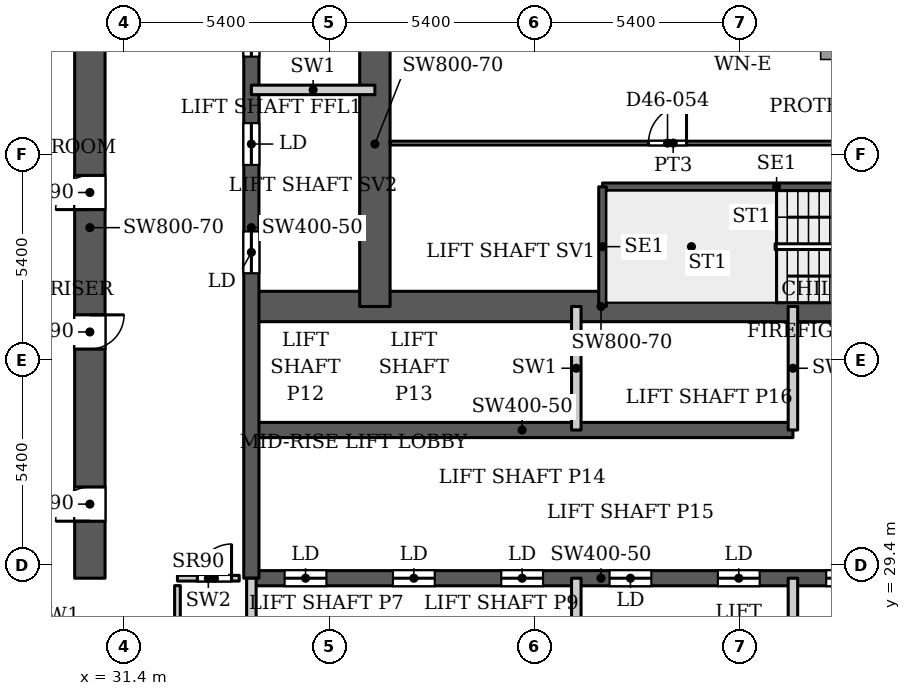
"""IFC4 building model, lengths in metres.
Left out: names, types, materials, properties, quantities, classifications, styles, units other than length and angle.
Written with IfcOpenShell. Run it as: python <this file> out.ifc"""

import sys

from ifc_helpers import new_model, si_unit, direction, frame, frame_2d, origin, place, context, subcontext, project, spatial, rectangle, extrude, source, transform, mapped, element, fill, save


model = new_model("IFC4")
c1 = context("Model", 3, precision=1e-05, world=origin(), true_north=direction((0.0, 1.0)))
c2 = subcontext(c1, "Body", "Model", "MODEL_VIEW")
j1 = project(units=[si_unit("LENGTHUNIT", "METRE"), si_unit("PLANEANGLEUNIT", "RADIAN")], contexts=[c1])
p1 = place(None, origin())
s1 = spatial("IfcSite", under=j1, at=p1, CompositionType="ELEMENT")
p2 = place(p1, origin())
s2 = spatial("IfcBuilding", under=s1, at=p2, CompositionType="ELEMENT")
p3 = place(p2, frame((0.0, 0.0, 199.4)))
s3 = spatial("IfcBuildingStorey", under=s2, at=p3, CompositionType="ELEMENT", Elevation=199.4)
p4 = place(p3, frame((34.75, 29.05, 0.0), z_axis=(0.0, 0.0, 1.0), x_axis=(1.0, 0.0, 0.0)))
e1 = element("IfcWall", 1, at=p4, inside=s3, PredefinedType="SHEAR", context=c2, shape_type="SweptSolid", body=[
    extrude(rectangle(XDim=18.4, YDim=0.4, at=frame_2d((9.2, 0.0))), origin(), (0.0, 0.0, 1.0), 3.9),
])
p5 = place(p4, frame((0.875, 0.0, 0.0)))
e2 = element("IfcOpeningElement", 2, at=p5, cuts=e1, PredefinedType="OPENING", context=c2, shape_type="SweptSolid", body=[
    extrude(rectangle(XDim=1.1, YDim=2.2, at=frame_2d((0.55, 1.1))), frame((0.0, 0.21, 0.0), z_axis=(0.0, -1.0, 0.0), x_axis=(1.0, 0.0, 0.0)), (0.0, 0.0, 1.0), 0.42),
])
p6 = place(p4, frame((3.725, 0.0, 0.0)))
e3 = element("IfcOpeningElement", 3, at=p6, cuts=e1, PredefinedType="OPENING", context=c2, shape_type="SweptSolid", body=[
    extrude(rectangle(XDim=1.1, YDim=2.2, at=frame_2d((0.55, 1.1))), frame((0.0, 0.21, 0.0), z_axis=(0.0, -1.0, 0.0), x_axis=(1.0, 0.0, 0.0)), (0.0, 0.0, 1.0), 0.42),
])
p7 = place(p4, frame((6.575, 0.0, 0.0)))
e4 = element("IfcOpeningElement", 4, at=p7, cuts=e1, PredefinedType="OPENING", context=c2, shape_type="SweptSolid", body=[
    extrude(rectangle(XDim=1.1, YDim=2.2, at=frame_2d((0.55, 1.1))), frame((0.0, 0.21, 0.0), z_axis=(0.0, -1.0, 0.0), x_axis=(1.0, 0.0, 0.0)), (0.0, 0.0, 1.0), 0.42),
])
p8 = place(p4, frame((9.425, 0.0, 0.0)))
e5 = element("IfcOpeningElement", 5, at=p8, cuts=e1, PredefinedType="OPENING", context=c2, shape_type="SweptSolid", body=[
    extrude(rectangle(XDim=1.1, YDim=2.2, at=frame_2d((0.55, 1.1))), frame((0.0, 0.21, 0.0), z_axis=(0.0, -1.0, 0.0), x_axis=(1.0, 0.0, 0.0)), (0.0, 0.0, 1.0), 0.42),
])
p9 = place(p4, frame((12.275, 0.0, 0.0)))
e6 = element("IfcOpeningElement", 6, at=p9, cuts=e1, PredefinedType="OPENING", context=c2, shape_type="SweptSolid", body=[
    extrude(rectangle(XDim=1.1, YDim=2.2, at=frame_2d((0.55, 1.1))), frame((0.0, 0.21, 0.0), z_axis=(0.0, -1.0, 0.0), x_axis=(1.0, 0.0, 0.0)), (0.0, 0.0, 1.0), 0.42),
])
p10 = place(p4, frame((15.125, 0.0, 0.0)))
e7 = element("IfcOpeningElement", 7, at=p10, cuts=e1, PredefinedType="OPENING", context=c2, shape_type="SweptSolid", body=[
    extrude(rectangle(XDim=1.1, YDim=2.2, at=frame_2d((0.55, 1.1))), frame((0.0, 0.21, 0.0), z_axis=(0.0, -1.0, 0.0), x_axis=(1.0, 0.0, 0.0)), (0.0, 0.0, 1.0), 0.42),
])
p11 = place(p3, frame((34.75, 32.95, 0.0), z_axis=(0.0, 0.0, 1.0), x_axis=(1.0, 0.0, 0.0)))
e8 = element("IfcWall", 8, at=p11, inside=s3, PredefinedType="SHEAR", context=c2, shape_type="SweptSolid", body=[
    extrude(rectangle(XDim=14.25, YDim=0.4, at=frame_2d((7.125, 0.0))), origin(), (0.0, 0.0, 1.0), 3.9),
])
p12 = place(p3, frame((34.75, 36.2, 0.0), z_axis=(0.0, 0.0, 1.0), x_axis=(1.0, 0.0, 0.0)))
e9 = element("IfcWall", 9, at=p12, inside=s3, PredefinedType="SHEAR", context=c2, shape_type="SweptSolid", body=[
    extrude(rectangle(XDim=18.4, YDim=0.8, at=frame_2d((9.2, 0.0))), origin(), (0.0, 0.0, 1.0), 3.9),
])
p13 = place(p12, frame((16.9, 0.0, 0.0)))
e10 = element("IfcOpeningElement", 10, at=p13, cuts=e9, PredefinedType="OPENING", context=c2, shape_type="SweptSolid", body=[
    extrude(rectangle(XDim=1.0, YDim=2.2, at=frame_2d((0.5, 1.1))), frame((0.0, 0.41, 0.0), z_axis=(0.0, -1.0, 0.0), x_axis=(1.0, 0.0, 0.0)), (0.0, 0.0, 1.0), 0.82),
])
p14 = place(p3, frame((34.75, 29.05, 0.0), z_axis=(0.0, 0.0, 1.0), x_axis=(0.0, 1.0, 0.0)))
e11 = element("IfcWall", 11, at=p14, inside=s3, PredefinedType="SHEAR", context=c2, shape_type="SweptSolid", body=[
    extrude(rectangle(XDim=18.45, YDim=0.4, at=frame_2d((9.225, 0.0))), origin(), (0.0, 0.0, 1.0), 3.9),
])
p15 = place(p14, frame((8.025, 0.0, 0.0)))
e12 = element("IfcOpeningElement", 12, at=p15, cuts=e11, PredefinedType="OPENING", context=c2, shape_type="SweptSolid", body=[
    extrude(rectangle(XDim=1.1, YDim=2.2, at=frame_2d((0.55, 1.1))), frame((0.0, 0.21, 0.0), z_axis=(0.0, -1.0, 0.0), x_axis=(1.0, 0.0, 0.0)), (0.0, 0.0, 1.0), 0.42),
])
p16 = place(p14, frame((10.875, 0.0, 0.0)))
e13 = element("IfcOpeningElement", 13, at=p16, cuts=e11, PredefinedType="OPENING", context=c2, shape_type="SweptSolid", body=[
    extrude(rectangle(XDim=1.1, YDim=2.2, at=frame_2d((0.55, 1.1))), frame((0.0, 0.21, 0.0), z_axis=(0.0, -1.0, 0.0), x_axis=(1.0, 0.0, 0.0)), (0.0, 0.0, 1.0), 0.42),
])
p17 = place(p14, frame((13.725, 0.0, 0.0)))
e14 = element("IfcOpeningElement", 14, at=p17, cuts=e11, PredefinedType="OPENING", context=c2, shape_type="SweptSolid", body=[
    extrude(rectangle(XDim=1.1, YDim=2.2, at=frame_2d((0.55, 1.1))), frame((0.0, 0.21, 0.0), z_axis=(0.0, -1.0, 0.0), x_axis=(1.0, 0.0, 0.0)), (0.0, 0.0, 1.0), 0.42),
])
p18 = place(p14, frame((15.95, 0.0, 0.0)))
e15 = element("IfcOpeningElement", 15, at=p18, cuts=e11, PredefinedType="OPENING", context=c2, shape_type="SweptSolid", body=[
    extrude(rectangle(XDim=1.1, YDim=2.2, at=frame_2d((0.55, 1.1))), frame((0.0, 0.21, 0.0), z_axis=(0.0, -1.0, 0.0), x_axis=(1.0, 0.0, 0.0)), (0.0, 0.0, 1.0), 0.42),
])
p19 = place(p3, frame((38.0, 36.2, 0.0), z_axis=(0.0, 0.0, 1.0), x_axis=(0.0, 1.0, 0.0)))
e16 = element("IfcWall", 16, at=p19, inside=s3, PredefinedType="SHEAR", context=c2, shape_type="SweptSolid", body=[
    extrude(rectangle(XDim=8.55, YDim=0.8, at=frame_2d((4.275, 0.0))), origin(), (0.0, 0.0, 1.0), 3.9),
])
p20 = place(p3, frame((30.5, 29.05, 0.0), z_axis=(0.0, 0.0, 1.0), x_axis=(0.0, 1.0, 0.0)))
e17 = element("IfcWall", 17, at=p20, inside=s3, PredefinedType="SHEAR", context=c2, shape_type="SweptSolid", body=[
    extrude(rectangle(XDim=18.45, YDim=0.8, at=frame_2d((9.225, 0.0))), origin(), (0.0, 0.0, 1.0), 3.9),
])
p21 = place(p20, frame((1.5, 0.0, 0.0)))
e18 = element("IfcOpeningElement", 18, at=p21, cuts=e17, PredefinedType="OPENING", context=c2, shape_type="SweptSolid", body=[
    extrude(rectangle(XDim=0.9, YDim=2.2, at=frame_2d((0.45, 1.1))), frame((0.0, 0.41, 0.0), z_axis=(0.0, -1.0, 0.0), x_axis=(1.0, 0.0, 0.0)), (0.0, 0.0, 1.0), 0.82),
])
p22 = place(p20, frame((6.03, 0.0, 0.0)))
e19 = element("IfcOpeningElement", 19, at=p22, cuts=e17, PredefinedType="OPENING", context=c2, shape_type="SweptSolid", body=[
    extrude(rectangle(XDim=0.9, YDim=2.2, at=frame_2d((0.45, 1.1))), frame((0.0, 0.41, 0.0), z_axis=(0.0, -1.0, 0.0), x_axis=(1.0, 0.0, 0.0)), (0.0, 0.0, 1.0), 0.82),
])
p23 = place(p20, frame((9.7, 0.0, 0.0)))
e20 = element("IfcOpeningElement", 20, at=p23, cuts=e17, PredefinedType="OPENING", context=c2, shape_type="SweptSolid", body=[
    extrude(rectangle(XDim=0.9, YDim=2.2, at=frame_2d((0.45, 1.1))), frame((0.0, 0.41, 0.0), z_axis=(0.0, -1.0, 0.0), x_axis=(1.0, 0.0, 0.0)), (0.0, 0.0, 1.0), 0.82),
])
p24 = place(p3, frame((29.712, 26.072, 0.0), z_axis=(0.0, 0.0, 1.0), x_axis=(-0.511028049012, 0.859564036662, 0.0)))
e21 = element("IfcWall", 21, at=p24, inside=s3, PredefinedType="SOLIDWALL", context=c2, shape_type="SweptSolid", body=[
    extrude(rectangle(XDim=4.634, YDim=0.25, at=frame_2d((2.317, 0.0))), origin(), (0.0, 0.0, 1.0), 3.217),
])
p25 = place(p3, frame((27.195, 31.969, 0.0), z_axis=(0.0, 0.0, 1.0), x_axis=(0.052554995867, 0.998618031286, 0.0)))
e22 = element("IfcWall", 22, at=p25, inside=s3, PredefinedType="SOLIDWALL", context=c2, shape_type="SweptSolid", body=[
    extrude(rectangle(XDim=66.787, YDim=0.25, at=frame_2d((33.394, 0.0))), origin(), (0.0, 0.0, 1.0), 3.75),
])
p26 = place(p3, frame((43.99, 39.35, 0.0), z_axis=(0.0, 0.0, 1.0), x_axis=(1.0, 0.0, 0.0)))
e23 = element("IfcWall", 23, at=p26, inside=s3, PredefinedType="SHEAR", context=c2, shape_type="SweptSolid", body=[
    extrude(rectangle(XDim=9.16, YDim=0.2, at=frame_2d((4.58, 0.0))), origin(), (0.0, 0.0, 1.0), 3.9),
])
p27 = place(p3, frame((43.99, 36.2, 0.0), z_axis=(0.0, 0.0, 1.0), x_axis=(0.0, 1.0, 0.0)))
e24 = element("IfcWall", 24, at=p27, inside=s3, PredefinedType="SHEAR", context=c2, shape_type="SweptSolid", body=[
    extrude(rectangle(XDim=3.15, YDim=0.2, at=frame_2d((1.575, 0.0))), origin(), (0.0, 0.0, 1.0), 3.9),
])
for number, where, z_axis, x_axis in (
    (25, (34.75, 25.8, 0.0), (0.0, 0.0, 1.0), (0.0, 1.0, 0.0)),
    (26, (43.3, 25.8, 0.0), (0.0, 0.0, 1.0), (0.0, 1.0, 0.0)),
    (27, (43.3, 32.95, 0.0), (0.0, 0.0, 1.0), (0.0, 1.0, 0.0)),
    (28, (49.0, 25.8, 0.0), (0.0, 0.0, 1.0), (0.0, 1.0, 0.0)),
    (29, (49.0, 32.95, 0.0), (0.0, 0.0, 1.0), (0.0, 1.0, 0.0)),
    (30, (34.75, 41.9, 0.0), (0.0, 0.0, 1.0), (1.0, 0.0, 0.0)),
):
    element("IfcWall", number, at=place(p3, frame(where, z_axis=z_axis, x_axis=x_axis)), inside=s3, PredefinedType="PARTITIONING", context=c2, shape_type="SweptSolid", body=[
        extrude(rectangle(XDim=3.25, YDim=0.25, at=frame_2d((1.625, 0.0))), origin(), (0.0, 0.0, 1.0), 3.9),
    ])
p28 = place(p3, frame((32.805, 29.05, 0.0), z_axis=(0.0, 0.0, 1.0), x_axis=(1.0, 0.0, 0.0)))
e31 = element("IfcWall", 31, at=p28, inside=s3, PredefinedType="PARTITIONING", context=c2, shape_type="SweptSolid", body=[
    extrude(rectangle(XDim=1.625, YDim=0.15, at=frame_2d((0.812, 0.0))), origin(), (0.0, 0.0, 1.0), 3.9),
])
p29 = place(p28, frame((0.523, 0.0, 0.0)))
e32 = element("IfcOpeningElement", 32, at=p29, cuts=e31, PredefinedType="OPENING", context=c2, shape_type="SweptSolid", body=[
    extrude(rectangle(XDim=0.9, YDim=2.2, at=frame_2d((0.45, 1.1))), frame((0.0, 0.085, 0.0), z_axis=(0.0, -1.0, 0.0), x_axis=(1.0, 0.0, 0.0)), (0.0, 0.0, 1.0), 0.17),
])
p30 = place(p3, frame((32.805, 24.98, 0.0), z_axis=(0.0, 0.0, 1.0), x_axis=(0.0, 1.0, 0.0)))
e33 = element("IfcWall", 33, at=p30, inside=s3, PredefinedType="PARTITIONING", context=c2, shape_type="SweptSolid", body=[
    extrude(rectangle(XDim=3.875, YDim=0.15, at=frame_2d((1.938, 0.0))), origin(), (0.0, 0.0, 1.0), 3.9),
])
p31 = place(p3, frame((38.399, 40.5, 0.0), z_axis=(0.0, 0.0, 1.0), x_axis=(1.0, 0.0, 0.0)))
e34 = element("IfcWall", 34, at=p31, inside=s3, PredefinedType="PARTITIONING", context=c2, shape_type="SweptSolid", body=[
    extrude(rectangle(XDim=14.901, YDim=0.1, at=frame_2d((7.451, 0.0))), origin(), (0.0, 0.0, 1.0), 3.6),
])
p32 = place(p31, frame((6.801, 0.0, 0.0)))
e35 = element("IfcOpeningElement", 35, at=p32, cuts=e34, PredefinedType="OPENING", context=c2, shape_type="SweptSolid", body=[
    extrude(rectangle(XDim=1.0, YDim=2.1, at=frame_2d((0.5, 1.05))), frame((0.0, 0.06, 0.0), z_axis=(0.0, -1.0, 0.0), x_axis=(1.0, 0.0, 0.0)), (0.0, 0.0, 1.0), 0.12),
])
m1 = source(origin(), c2, "Body", "SweptSolid", [
    extrude(rectangle(XDim=1.1, YDim=2.2, at=frame_2d((0.55, 1.1))), frame((0.0, 0.025, 0.0), z_axis=(0.0, -1.0, 0.0), x_axis=(1.0, 0.0, 0.0)), (0.0, 0.0, 1.0), 0.05),
])
p33 = place(p5, origin())
e36 = element("IfcDoor", 36, at=p33, inside=s3, OperationType="SLIDING_TO_LEFT", PredefinedType="DOOR", context=c2, shape_type="MappedRepresentation", body=[
    mapped(m1, transform((0.0, 0.0, 0.0), x_axis=(1.0, 0.0, 0.0), y_axis=(0.0, 1.0, 0.0), z_axis=(0.0, 0.0, 1.0), scale=1.0)),
])
fill(e2, e36)
p34 = place(p6, origin())
e37 = element("IfcDoor", 37, at=p34, inside=s3, OperationType="SLIDING_TO_LEFT", PredefinedType="DOOR", context=c2, shape_type="MappedRepresentation", body=[
    mapped(m1, transform((0.0, 0.0, 0.0), x_axis=(1.0, 0.0, 0.0), y_axis=(0.0, 1.0, 0.0), z_axis=(0.0, 0.0, 1.0), scale=1.0)),
])
fill(e3, e37)
p35 = place(p7, origin())
e38 = element("IfcDoor", 38, at=p35, inside=s3, OperationType="SLIDING_TO_LEFT", PredefinedType="DOOR", context=c2, shape_type="MappedRepresentation", body=[
    mapped(m1, transform((0.0, 0.0, 0.0), x_axis=(1.0, 0.0, 0.0), y_axis=(0.0, 1.0, 0.0), z_axis=(0.0, 0.0, 1.0), scale=1.0)),
])
fill(e4, e38)
p36 = place(p8, origin())
e39 = element("IfcDoor", 39, at=p36, inside=s3, OperationType="SLIDING_TO_LEFT", PredefinedType="DOOR", context=c2, shape_type="MappedRepresentation", body=[
    mapped(m1, transform((0.0, 0.0, 0.0), x_axis=(1.0, 0.0, 0.0), y_axis=(0.0, 1.0, 0.0), z_axis=(0.0, 0.0, 1.0), scale=1.0)),
])
fill(e5, e39)
p37 = place(p9, origin())
e40 = element("IfcDoor", 40, at=p37, inside=s3, OperationType="SLIDING_TO_LEFT", PredefinedType="DOOR", context=c2, shape_type="MappedRepresentation", body=[
    mapped(m1, transform((0.0, 0.0, 0.0), x_axis=(1.0, 0.0, 0.0), y_axis=(0.0, 1.0, 0.0), z_axis=(0.0, 0.0, 1.0), scale=1.0)),
])
fill(e6, e40)
p38 = place(p15, origin())
e41 = element("IfcDoor", 41, at=p38, inside=s3, OperationType="SLIDING_TO_LEFT", PredefinedType="DOOR", context=c2, shape_type="MappedRepresentation", body=[
    mapped(m1, transform((0.0, 0.0, 0.0), x_axis=(1.0, 0.0, 0.0), y_axis=(0.0, 1.0, 0.0), z_axis=(0.0, 0.0, 1.0), scale=1.0)),
])
fill(e12, e41)
p39 = place(p16, origin())
e42 = element("IfcDoor", 42, at=p39, inside=s3, OperationType="SLIDING_TO_LEFT", PredefinedType="DOOR", context=c2, shape_type="MappedRepresentation", body=[
    mapped(m1, transform((0.0, 0.0, 0.0), x_axis=(1.0, 0.0, 0.0), y_axis=(0.0, 1.0, 0.0), z_axis=(0.0, 0.0, 1.0), scale=1.0)),
])
fill(e13, e42)
p40 = place(p17, origin())
e43 = element("IfcDoor", 43, at=p40, inside=s3, OperationType="SLIDING_TO_LEFT", PredefinedType="DOOR", context=c2, shape_type="MappedRepresentation", body=[
    mapped(m1, transform((0.0, 0.0, 0.0), x_axis=(1.0, 0.0, 0.0), y_axis=(0.0, 1.0, 0.0), z_axis=(0.0, 0.0, 1.0), scale=1.0)),
])
fill(e14, e43)
p41 = place(p10, origin())
e44 = element("IfcDoor", 44, at=p41, inside=s3, OperationType="SLIDING_TO_LEFT", PredefinedType="DOOR", context=c2, shape_type="MappedRepresentation", body=[
    mapped(m1, transform((0.0, 0.0, 0.0), x_axis=(1.0, 0.0, 0.0), y_axis=(0.0, 1.0, 0.0), z_axis=(0.0, 0.0, 1.0), scale=1.0)),
])
fill(e7, e44)
m2 = source(origin(), c2, "Body", "SweptSolid", [
    extrude(rectangle(XDim=0.9, YDim=2.2, at=frame_2d((0.45, 1.1))), frame((0.0, 0.025, 0.0), z_axis=(0.0, -1.0, 0.0), x_axis=(1.0, 0.0, 0.0)), (0.0, 0.0, 1.0), 0.05),
])
p42 = place(p21, origin())
e45 = element("IfcDoor", 45, at=p42, inside=s3, OperationType="SINGLE_SWING_LEFT", PredefinedType="DOOR", context=c2, shape_type="MappedRepresentation", body=[
    mapped(m2, transform((0.0, 0.0, 0.0), x_axis=(1.0, 0.0, 0.0), y_axis=(0.0, 1.0, 0.0), z_axis=(0.0, 0.0, 1.0), scale=1.0)),
])
fill(e18, e45)
p43 = place(p22, origin())
e46 = element("IfcDoor", 46, at=p43, inside=s3, OperationType="SINGLE_SWING_RIGHT", PredefinedType="DOOR", context=c2, shape_type="MappedRepresentation", body=[
    mapped(m2, transform((0.0, 0.0, 0.0), x_axis=(1.0, 0.0, 0.0), y_axis=(0.0, 1.0, 0.0), z_axis=(0.0, 0.0, 1.0), scale=1.0)),
])
fill(e19, e46)
p44 = place(p23, origin())
e47 = element("IfcDoor", 47, at=p44, inside=s3, OperationType="SINGLE_SWING_LEFT", PredefinedType="DOOR", context=c2, shape_type="MappedRepresentation", body=[
    mapped(m2, transform((0.0, 0.0, 0.0), x_axis=(1.0, 0.0, 0.0), y_axis=(0.0, 1.0, 0.0), z_axis=(0.0, 0.0, 1.0), scale=1.0)),
])
fill(e20, e47)
p45 = place(p29, origin())
e48 = element("IfcDoor", 48, at=p45, inside=s3, OperationType="SINGLE_SWING_LEFT", PredefinedType="DOOR", context=c2, shape_type="MappedRepresentation", body=[
    mapped(m2, transform((0.0, 0.0, 0.0), x_axis=(1.0, 0.0, 0.0), y_axis=(0.0, 1.0, 0.0), z_axis=(0.0, 0.0, 1.0), scale=1.0)),
])
fill(e32, e48)
m3 = source(origin(), c2, "Body", "SweptSolid", [
    extrude(rectangle(XDim=1.0, YDim=2.1, at=frame_2d((0.5, 1.05))), frame((0.0, 0.025, 0.0), z_axis=(0.0, -1.0, 0.0), x_axis=(1.0, 0.0, 0.0)), (0.0, 0.0, 1.0), 0.05),
])
p46 = place(p32, origin())
e49 = element("IfcDoor", 49, at=p46, inside=s3, OperationType="SINGLE_SWING_LEFT", PredefinedType="DOOR", context=c2, shape_type="MappedRepresentation", body=[
    mapped(m3, transform((0.0, 0.0, 0.0), x_axis=(1.0, 0.0, 0.0), y_axis=(0.0, 1.0, 0.0), z_axis=(0.0, 0.0, 1.0), scale=1.0)),
])
fill(e35, e49)
save(model, sys.argv[1])
